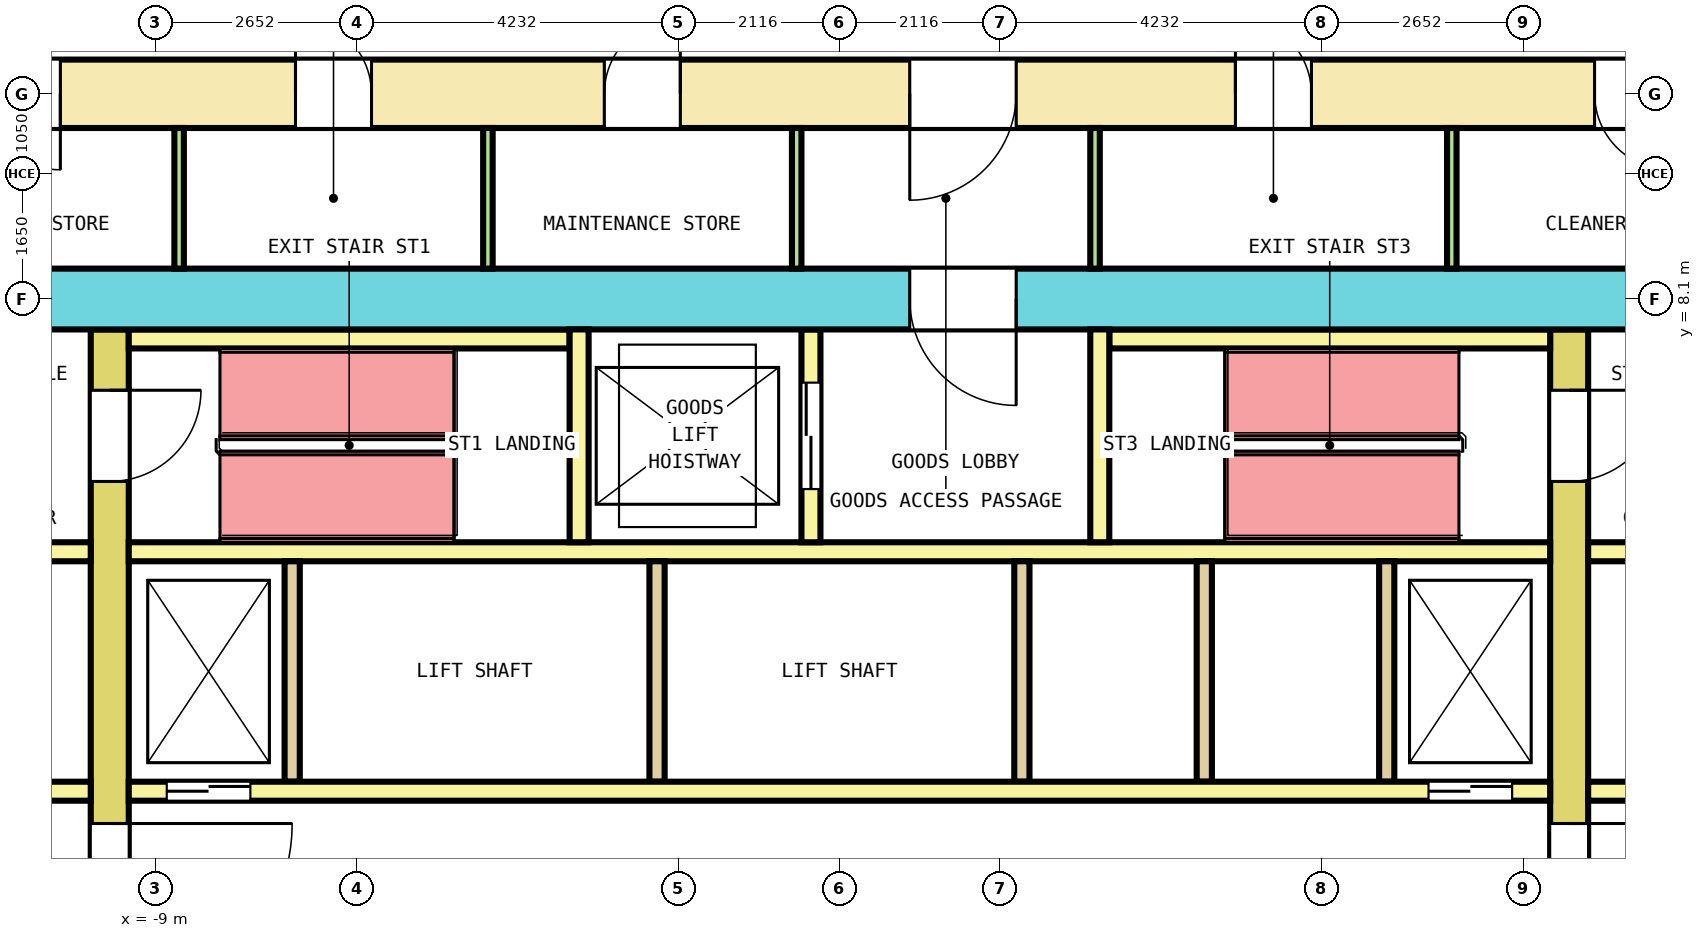
"""IFC4 building model, lengths in metres.
Left out: names, types, materials, properties, quantities, classifications, styles, units other than length and angle.
Written with IfcOpenShell. Run it as: python <this file> out.ifc"""

import sys

from ifc_helpers import new_model, si_unit, direction, frame, frame_2d, origin, place, context, subcontext, project, spatial, rectangle, extrude, element, fill, save


model = new_model("IFC4")
c1 = context("Model", 3, precision=1e-05, world=origin(), true_north=direction((0.0, 1.0)))
c2 = subcontext(c1, "Body", "Model", "MODEL_VIEW")
j1 = project(units=[si_unit("LENGTHUNIT", "METRE"), si_unit("PLANEANGLEUNIT", "RADIAN")], contexts=[c1])
p1 = place(None, origin())
s1 = spatial("IfcSite", under=j1, at=p1, CompositionType="ELEMENT")
p2 = place(p1, origin())
s2 = spatial("IfcBuilding", under=s1, at=p2, CompositionType="ELEMENT")
p3 = place(p2, frame((0.0, 0.0, 36.6)))
s3 = spatial("IfcBuildingStorey", under=s2, at=p3, CompositionType="ELEMENT", Elevation=36.6)
p4 = place(p3, frame((-13.65, 10.8, 0.0), z_axis=(0.0, 0.0, 1.0), x_axis=(1.0, 0.0, 0.0)))
e1 = element("IfcWall", 1, at=p4, inside=s3, PredefinedType="SHEAR", context=c2, shape_type="SweptSolid", body=[
    extrude(rectangle(XDim=27.3, YDim=0.9, at=frame_2d((13.65, 0.0))), origin(), (0.0, 0.0, 1.0), 4.1),
])
p5 = place(p4, frame((2.4, 0.0, 0.0)))
e2 = element("IfcOpeningElement", 2, at=p5, cuts=e1, PredefinedType="OPENING", context=c2, shape_type="SweptSolid", body=[
    extrude(rectangle(XDim=1.0, YDim=2.1, at=frame_2d((0.5, 1.05))), frame((0.0, 0.46, 0.0), z_axis=(0.0, -1.0, 0.0), x_axis=(1.0, 0.0, 0.0)), (0.0, 0.0, 1.0), 0.92),
])
p6 = place(p4, frame((6.494, 0.0, 0.0)))
e3 = element("IfcOpeningElement", 3, at=p6, cuts=e1, PredefinedType="OPENING", context=c2, shape_type="SweptSolid", body=[
    extrude(rectangle(XDim=1.0, YDim=2.1, at=frame_2d((0.5, 1.05))), frame((0.0, 0.46, 0.0), z_axis=(0.0, -1.0, 0.0), x_axis=(1.0, 0.0, 0.0)), (0.0, 0.0, 1.0), 0.92),
])
p7 = place(p4, frame((10.556, 0.0, 0.0)))
e4 = element("IfcOpeningElement", 4, at=p7, cuts=e1, PredefinedType="OPENING", context=c2, shape_type="SweptSolid", body=[
    extrude(rectangle(XDim=1.0, YDim=2.1, at=frame_2d((0.5, 1.05))), frame((0.0, 0.46, 0.0), z_axis=(0.0, -1.0, 0.0), x_axis=(1.0, 0.0, 0.0)), (0.0, 0.0, 1.0), 0.92),
])
p8 = place(p4, frame((18.859, 0.0, 0.0)))
e5 = element("IfcOpeningElement", 5, at=p8, cuts=e1, PredefinedType="OPENING", context=c2, shape_type="SweptSolid", body=[
    extrude(rectangle(XDim=1.0, YDim=2.1, at=frame_2d((0.5, 1.05))), frame((0.0, 0.46, 0.0), z_axis=(0.0, -1.0, 0.0), x_axis=(1.0, 0.0, 0.0)), (0.0, 0.0, 1.0), 0.92),
])
p9 = place(p4, frame((23.584, 0.0, 0.0)))
e6 = element("IfcOpeningElement", 6, at=p9, cuts=e1, PredefinedType="OPENING", context=c2, shape_type="SweptSolid", body=[
    extrude(rectangle(XDim=1.0, YDim=2.1, at=frame_2d((0.5, 1.05))), frame((0.0, 0.46, 0.0), z_axis=(0.0, -1.0, 0.0), x_axis=(1.0, 0.0, 0.0)), (0.0, 0.0, 1.0), 0.92),
])
p10 = place(p4, frame((14.575, 0.0, 0.0)))
e7 = element("IfcOpeningElement", 7, at=p10, cuts=e1, PredefinedType="OPENING", context=c2, shape_type="SweptSolid", body=[
    extrude(rectangle(XDim=1.4, YDim=2.1, at=frame_2d((0.7, 1.05))), frame((0.0, 0.46, 0.0), z_axis=(0.0, -1.0, 0.0), x_axis=(1.0, 0.0, 0.0)), (0.0, 0.0, 1.0), 0.92),
])
p11 = place(p3, frame((-12.75, 8.1, 0.0), z_axis=(0.0, 0.0, 1.0), x_axis=(1.0, 0.0, 0.0)))
e8 = element("IfcWall", 8, at=p11, inside=s3, PredefinedType="SHEAR", context=c2, shape_type="SweptSolid", body=[
    extrude(rectangle(XDim=25.5, YDim=0.8, at=frame_2d((12.75, 0.0))), origin(), (0.0, 0.0, 1.0), 4.1),
])
p12 = place(p11, frame((13.675, 0.0, 0.0)))
e9 = element("IfcOpeningElement", 9, at=p12, cuts=e8, PredefinedType="OPENING", context=c2, shape_type="SweptSolid", body=[
    extrude(rectangle(XDim=1.4, YDim=2.1, at=frame_2d((0.7, 1.05))), frame((0.0, 0.41, 0.0), z_axis=(0.0, -1.0, 0.0), x_axis=(1.0, 0.0, 0.0)), (0.0, 0.0, 1.0), 0.82),
])
p13 = place(p3, frame((-9.6, -7.7, 0.0), z_axis=(0.0, 0.0, 1.0), x_axis=(0.0, 1.0, 0.0)))
e10 = element("IfcWall", 10, at=p13, inside=s3, PredefinedType="SHEAR", context=c2, shape_type="SweptSolid", body=[
    extrude(rectangle(XDim=15.4, YDim=0.5, at=frame_2d((7.7, 0.0))), origin(), (0.0, 0.0, 1.0), 4.1),
])
p14 = place(p13, frame((6.5, 0.0, 0.0)))
e11 = element("IfcOpeningElement", 11, at=p14, cuts=e10, PredefinedType="OPENING", context=c2, shape_type="SweptSolid", body=[
    extrude(rectangle(XDim=2.4, YDim=2.1, at=frame_2d((1.2, 1.05))), frame((0.0, 0.26, 0.0), z_axis=(0.0, -1.0, 0.0), x_axis=(1.0, 0.0, 0.0)), (0.0, 0.0, 1.0), 0.52),
])
p15 = place(p13, frame((13.4, 0.0, 0.0)))
e12 = element("IfcOpeningElement", 12, at=p15, cuts=e10, PredefinedType="OPENING", context=c2, shape_type="SweptSolid", body=[
    extrude(rectangle(XDim=1.2, YDim=2.1, at=frame_2d((0.6, 1.05))), frame((0.0, 0.26, 0.0), z_axis=(0.0, -1.0, 0.0), x_axis=(1.0, 0.0, 0.0)), (0.0, 0.0, 1.0), 0.52),
])
p16 = place(p13, frame((0.8, 0.0, 0.0)))
e13 = element("IfcOpeningElement", 13, at=p16, cuts=e10, PredefinedType="OPENING", context=c2, shape_type="SweptSolid", body=[
    extrude(rectangle(XDim=1.2, YDim=2.1, at=frame_2d((0.6, 1.05))), frame((0.0, 0.26, 0.0), z_axis=(0.0, -1.0, 0.0), x_axis=(1.0, 0.0, 0.0)), (0.0, 0.0, 1.0), 0.52),
])
p17 = place(p3, frame((9.6, -7.7, 0.0), z_axis=(0.0, 0.0, 1.0), x_axis=(0.0, 1.0, 0.0)))
e14 = element("IfcWall", 14, at=p17, inside=s3, PredefinedType="SHEAR", context=c2, shape_type="SweptSolid", body=[
    extrude(rectangle(XDim=15.4, YDim=0.5, at=frame_2d((7.7, 0.0))), origin(), (0.0, 0.0, 1.0), 4.1),
])
p18 = place(p17, frame((6.5, 0.0, 0.0)))
e15 = element("IfcOpeningElement", 15, at=p18, cuts=e14, PredefinedType="OPENING", context=c2, shape_type="SweptSolid", body=[
    extrude(rectangle(XDim=2.4, YDim=2.1, at=frame_2d((1.2, 1.05))), frame((0.0, 0.26, 0.0), z_axis=(0.0, -1.0, 0.0), x_axis=(1.0, 0.0, 0.0)), (0.0, 0.0, 1.0), 0.52),
])
p19 = place(p17, frame((13.4, 0.0, 0.0)))
e16 = element("IfcOpeningElement", 16, at=p19, cuts=e14, PredefinedType="OPENING", context=c2, shape_type="SweptSolid", body=[
    extrude(rectangle(XDim=1.2, YDim=2.1, at=frame_2d((0.6, 1.05))), frame((0.0, 0.26, 0.0), z_axis=(0.0, -1.0, 0.0), x_axis=(1.0, 0.0, 0.0)), (0.0, 0.0, 1.0), 0.52),
])
p20 = place(p17, frame((0.9, 0.0, 0.0)))
e17 = element("IfcOpeningElement", 17, at=p20, cuts=e14, PredefinedType="OPENING", context=c2, shape_type="SweptSolid", body=[
    extrude(rectangle(XDim=1.0, YDim=2.1, at=frame_2d((0.5, 1.05))), frame((0.0, 0.26, 0.0), z_axis=(0.0, -1.0, 0.0), x_axis=(1.0, 0.0, 0.0)), (0.0, 0.0, 1.0), 0.52),
])
p21 = place(p3, frame((-12.75, 1.625, 0.0), z_axis=(0.0, 0.0, 1.0), x_axis=(1.0, 0.0, 0.0)))
e18 = element("IfcWall", 18, at=p21, inside=s3, PredefinedType="SOLIDWALL", context=c2, shape_type="SweptSolid", body=[
    extrude(rectangle(XDim=2.9, YDim=0.25, at=frame_2d((1.45, 0.0))), origin(), (0.0, 0.0, 1.0), 4.1),
])
p22 = place(p21, frame((0.9, 0.0, 0.0)))
e19 = element("IfcOpeningElement", 19, at=p22, cuts=e18, PredefinedType="OPENING", context=c2, shape_type="SweptSolid", body=[
    extrude(rectangle(XDim=1.1, YDim=2.1, at=frame_2d((0.55, 1.05))), frame((0.0, 0.135, 0.0), z_axis=(0.0, -1.0, 0.0), x_axis=(1.0, 0.0, 0.0)), (0.0, 0.0, 1.0), 0.27),
])
p23 = place(p3, frame((-9.35, 1.625, 0.0), z_axis=(0.0, 0.0, 1.0), x_axis=(1.0, 0.0, 0.0)))
e20 = element("IfcWall", 20, at=p23, inside=s3, PredefinedType="SOLIDWALL", context=c2, shape_type="SweptSolid", body=[
    extrude(rectangle(XDim=18.7, YDim=0.25, at=frame_2d((9.35, 0.0))), origin(), (0.0, 0.0, 1.0), 4.1),
])
p24 = place(p23, frame((0.5, 0.0, 0.0)))
e21 = element("IfcOpeningElement", 21, at=p24, cuts=e20, PredefinedType="OPENING", context=c2, shape_type="SweptSolid", body=[
    extrude(rectangle(XDim=1.1, YDim=2.1, at=frame_2d((0.55, 1.05))), frame((0.0, 0.135, 0.0), z_axis=(0.0, -1.0, 0.0), x_axis=(1.0, 0.0, 0.0)), (0.0, 0.0, 1.0), 0.27),
])
p25 = place(p23, frame((17.1, 0.0, 0.0)))
e22 = element("IfcOpeningElement", 22, at=p25, cuts=e20, PredefinedType="OPENING", context=c2, shape_type="SweptSolid", body=[
    extrude(rectangle(XDim=1.1, YDim=2.1, at=frame_2d((0.55, 1.05))), frame((0.0, 0.135, 0.0), z_axis=(0.0, -1.0, 0.0), x_axis=(1.0, 0.0, 0.0)), (0.0, 0.0, 1.0), 0.27),
])
p26 = place(p3, frame((9.85, 1.625, 0.0), z_axis=(0.0, 0.0, 1.0), x_axis=(1.0, 0.0, 0.0)))
e23 = element("IfcWall", 23, at=p26, inside=s3, PredefinedType="SOLIDWALL", context=c2, shape_type="SweptSolid", body=[
    extrude(rectangle(XDim=2.9, YDim=0.25, at=frame_2d((1.45, 0.0))), origin(), (0.0, 0.0, 1.0), 4.1),
])
p27 = place(p26, frame((0.9, 0.0, 0.0)))
e24 = element("IfcOpeningElement", 24, at=p27, cuts=e23, PredefinedType="OPENING", context=c2, shape_type="SweptSolid", body=[
    extrude(rectangle(XDim=1.1, YDim=2.1, at=frame_2d((0.55, 1.05))), frame((0.0, 0.135, 0.0), z_axis=(0.0, -1.0, 0.0), x_axis=(1.0, 0.0, 0.0)), (0.0, 0.0, 1.0), 0.27),
])
p28 = place(p3, frame((-12.75, 4.775, 0.0), z_axis=(0.0, 0.0, 1.0), x_axis=(1.0, 0.0, 0.0)))
e25 = element("IfcWall", 25, at=p28, inside=s3, PredefinedType="SOLIDWALL", context=c2, shape_type="SweptSolid", body=[
    extrude(rectangle(XDim=2.9, YDim=0.25, at=frame_2d((1.45, 0.0))), origin(), (0.0, 0.0, 1.0), 4.1),
])
p29 = place(p3, frame((-9.35, 4.775, 0.0), z_axis=(0.0, 0.0, 1.0), x_axis=(1.0, 0.0, 0.0)))
e26 = element("IfcWall", 26, at=p29, inside=s3, PredefinedType="SOLIDWALL", context=c2, shape_type="SweptSolid", body=[
    extrude(rectangle(XDim=18.7, YDim=0.25, at=frame_2d((9.35, 0.0))), origin(), (0.0, 0.0, 1.0), 4.1),
])
p30 = place(p3, frame((9.85, 4.775, 0.0), z_axis=(0.0, 0.0, 1.0), x_axis=(1.0, 0.0, 0.0)))
e27 = element("IfcWall", 27, at=p30, inside=s3, PredefinedType="SOLIDWALL", context=c2, shape_type="SweptSolid", body=[
    extrude(rectangle(XDim=2.9, YDim=0.25, at=frame_2d((1.45, 0.0))), origin(), (0.0, 0.0, 1.0), 4.1),
])
for number, where, z_axis, x_axis in (
    (28, (-7.2, 1.75, 0.0), (0.0, 0.0, 1.0), (0.0, 1.0, 0.0)),
    (29, (-2.4, 1.75, 0.0), (0.0, 0.0, 1.0), (0.0, 1.0, 0.0)),
    (30, (2.4, 1.75, 0.0), (0.0, 0.0, 1.0), (0.0, 1.0, 0.0)),
    (31, (4.8, 1.75, 0.0), (0.0, 0.0, 1.0), (0.0, 1.0, 0.0)),
    (32, (7.2, 1.75, 0.0), (0.0, 0.0, 1.0), (0.0, 1.0, 0.0)),
):
    element("IfcWall", number, at=place(p3, frame(where, z_axis=z_axis, x_axis=x_axis)), inside=s3, PredefinedType="SOLIDWALL", context=c2, shape_type="SweptSolid", body=[
        extrude(rectangle(XDim=2.9, YDim=0.2, at=frame_2d((1.45, 0.0))), origin(), (0.0, 0.0, 1.0), 4.1),
    ])
for number, where, z_axis, x_axis in (
    (33, (-9.35, 7.575, 0.0), (0.0, 0.0, 1.0), (1.0, 0.0, 0.0)),
    (34, (3.55, 7.575, 0.0), (0.0, 0.0, 1.0), (1.0, 0.0, 0.0)),
):
    element("IfcWall", number, at=place(p3, frame(where, z_axis=z_axis, x_axis=x_axis)), inside=s3, PredefinedType="SOLIDWALL", context=c2, shape_type="SweptSolid", body=[
        extrude(rectangle(XDim=5.8, YDim=0.25, at=frame_2d((2.9, 0.0))), origin(), (0.0, 0.0, 1.0), 4.1),
    ])
p31 = place(p3, frame((-3.425, 4.9, 0.0), z_axis=(0.0, 0.0, 1.0), x_axis=(0.0, 1.0, 0.0)))
e35 = element("IfcWall", 35, at=p31, inside=s3, PredefinedType="SOLIDWALL", context=c2, shape_type="SweptSolid", body=[
    extrude(rectangle(XDim=2.8, YDim=0.25, at=frame_2d((1.4, 0.0))), origin(), (0.0, 0.0, 1.0), 4.1),
])
p32 = place(p3, frame((-0.375, 4.9, 0.0), z_axis=(0.0, 0.0, 1.0), x_axis=(0.0, 1.0, 0.0)))
e36 = element("IfcWall", 36, at=p32, inside=s3, PredefinedType="SOLIDWALL", context=c2, shape_type="SweptSolid", body=[
    extrude(rectangle(XDim=2.8, YDim=0.25, at=frame_2d((1.4, 0.0))), origin(), (0.0, 0.0, 1.0), 4.1),
])
p33 = place(p32, frame((0.7, 0.0, 0.0)))
e37 = element("IfcOpeningElement", 37, at=p33, cuts=e36, PredefinedType="OPENING", context=c2, shape_type="SweptSolid", body=[
    extrude(rectangle(XDim=1.4, YDim=2.1, at=frame_2d((0.7, 1.05))), frame((0.0, 0.135, 0.0), z_axis=(0.0, -1.0, 0.0), x_axis=(1.0, 0.0, 0.0)), (0.0, 0.0, 1.0), 0.27),
])
p34 = place(p3, frame((3.425, 4.9, 0.0), z_axis=(0.0, 0.0, 1.0), x_axis=(0.0, 1.0, 0.0)))
e38 = element("IfcWall", 38, at=p34, inside=s3, PredefinedType="SOLIDWALL", context=c2, shape_type="SweptSolid", body=[
    extrude(rectangle(XDim=2.8, YDim=0.25, at=frame_2d((1.4, 0.0))), origin(), (0.0, 0.0, 1.0), 4.1),
])
for number, where, z_axis, x_axis in (
    (39, (-8.688, 8.5, 0.0), (0.0, 0.0, 1.0), (0.0, 1.0, 0.0)),
    (40, (-4.625, 8.5, 0.0), (0.0, 0.0, 1.0), (0.0, 1.0, 0.0)),
    (41, (-0.562, 8.5, 0.0), (0.0, 0.0, 1.0), (0.0, 1.0, 0.0)),
    (42, (3.363, 8.5, 0.0), (0.0, 0.0, 1.0), (0.0, 1.0, 0.0)),
    (43, (8.056, 8.5, 0.0), (0.0, 0.0, 1.0), (0.0, 1.0, 0.0)),
):
    element("IfcWall", number, at=place(p3, frame(where, z_axis=z_axis, x_axis=x_axis)), inside=s3, PredefinedType="PARTITIONING", context=c2, shape_type="SweptSolid", body=[
        extrude(rectangle(XDim=1.85, YDim=0.125, at=frame_2d((0.925, 0.0))), origin(), (0.0, 0.0, 1.0), 4.1),
    ])
p35 = place(p24, origin())
e44 = element("IfcDoor", 44, at=p35, inside=s3, OperationType="DOUBLE_DOOR_SLIDING", PredefinedType="DOOR", context=c2, shape_type="SweptSolid", body=[
    extrude(rectangle(XDim=1.1, YDim=2.1, at=frame_2d((0.55, 1.05))), frame((0.0, 0.075, 0.0), z_axis=(0.0, -1.0, 0.0), x_axis=(1.0, 0.0, 0.0)), (0.0, 0.0, 1.0), 0.15),
])
fill(e21, e44)
p36 = place(p25, origin())
e45 = element("IfcDoor", 45, at=p36, inside=s3, OperationType="DOUBLE_DOOR_SLIDING", PredefinedType="DOOR", context=c2, shape_type="SweptSolid", body=[
    extrude(rectangle(XDim=1.1, YDim=2.1, at=frame_2d((0.55, 1.05))), frame((0.0, 0.075, 0.0), z_axis=(0.0, -1.0, 0.0), x_axis=(1.0, 0.0, 0.0)), (0.0, 0.0, 1.0), 0.15),
])
fill(e22, e45)
p37 = place(p33, origin())
e46 = element("IfcDoor", 46, at=p37, inside=s3, OperationType="DOUBLE_DOOR_SLIDING", PredefinedType="DOOR", context=c2, shape_type="SweptSolid", body=[
    extrude(rectangle(XDim=1.4, YDim=2.1, at=frame_2d((0.7, 1.05))), frame((0.0, 0.075, 0.0), z_axis=(0.0, -1.0, 0.0), x_axis=(1.0, 0.0, 0.0)), (0.0, 0.0, 1.0), 0.15),
])
fill(e37, e46)
p38 = place(p14, origin())
e47 = element("IfcDoor", 47, at=p38, inside=s3, OperationType="DOUBLE_DOOR_SINGLE_SWING", PredefinedType="DOOR", context=c2, shape_type="SweptSolid", body=[
    extrude(rectangle(XDim=2.4, YDim=2.1, at=frame_2d((1.2, 1.05))), frame((0.0, 0.2, 0.0), z_axis=(0.0, -1.0, 0.0), x_axis=(1.0, 0.0, 0.0)), (0.0, 0.0, 1.0), 0.4),
])
fill(e11, e47)
p39 = place(p18, origin())
e48 = element("IfcDoor", 48, at=p39, inside=s3, OperationType="DOUBLE_DOOR_SINGLE_SWING", PredefinedType="DOOR", context=c2, shape_type="SweptSolid", body=[
    extrude(rectangle(XDim=2.4, YDim=2.1, at=frame_2d((1.2, 1.05))), frame((0.0, 0.2, 0.0), z_axis=(0.0, -1.0, 0.0), x_axis=(1.0, 0.0, 0.0)), (0.0, 0.0, 1.0), 0.4),
])
fill(e15, e48)
p40 = place(p15, origin())
e49 = element("IfcDoor", 49, at=p40, inside=s3, OperationType="SINGLE_SWING_RIGHT", PredefinedType="DOOR", context=c2, shape_type="SweptSolid", body=[
    extrude(rectangle(XDim=1.2, YDim=2.1, at=frame_2d((0.6, 1.05))), frame((0.0, 0.2, 0.0), z_axis=(0.0, -1.0, 0.0), x_axis=(1.0, 0.0, 0.0)), (0.0, 0.0, 1.0), 0.4),
])
fill(e12, e49)
p41 = place(p19, origin())
e50 = element("IfcDoor", 50, at=p41, inside=s3, OperationType="SINGLE_SWING_RIGHT", PredefinedType="DOOR", context=c2, shape_type="SweptSolid", body=[
    extrude(rectangle(XDim=1.2, YDim=2.1, at=frame_2d((0.6, 1.05))), frame((0.0, 0.2, 0.0), z_axis=(0.0, -1.0, 0.0), x_axis=(1.0, 0.0, 0.0)), (0.0, 0.0, 1.0), 0.4),
])
fill(e16, e50)
p42 = place(p12, origin())
e51 = element("IfcDoor", 51, at=p42, inside=s3, OperationType="DOUBLE_DOOR_SINGLE_SWING", PredefinedType="DOOR", context=c2, shape_type="SweptSolid", body=[
    extrude(rectangle(XDim=1.4, YDim=2.1, at=frame_2d((0.7, 1.05))), frame((0.0, 0.3, 0.0), z_axis=(0.0, -1.0, 0.0), x_axis=(1.0, 0.0, 0.0)), (0.0, 0.0, 1.0), 0.6),
])
fill(e9, e51)
p43 = place(p5, origin())
e52 = element("IfcDoor", 52, at=p43, inside=s3, OperationType="SINGLE_SWING_LEFT", PredefinedType="DOOR", context=c2, shape_type="SweptSolid", body=[
    extrude(rectangle(XDim=1.0, YDim=2.1, at=frame_2d((0.5, 1.05))), frame((0.0, 0.3, 0.0), z_axis=(0.0, -1.0, 0.0), x_axis=(1.0, 0.0, 0.0)), (0.0, 0.0, 1.0), 0.6),
])
fill(e2, e52)
p44 = place(p6, origin())
e53 = element("IfcDoor", 53, at=p44, inside=s3, OperationType="SINGLE_SWING_RIGHT", PredefinedType="DOOR", context=c2, shape_type="SweptSolid", body=[
    extrude(rectangle(XDim=1.0, YDim=2.1, at=frame_2d((0.5, 1.05))), frame((0.0, 0.3, 0.0), z_axis=(0.0, -1.0, 0.0), x_axis=(1.0, 0.0, 0.0)), (0.0, 0.0, 1.0), 0.6),
])
fill(e3, e53)
p45 = place(p7, origin())
e54 = element("IfcDoor", 54, at=p45, inside=s3, OperationType="SINGLE_SWING_LEFT", PredefinedType="DOOR", context=c2, shape_type="SweptSolid", body=[
    extrude(rectangle(XDim=1.0, YDim=2.1, at=frame_2d((0.5, 1.05))), frame((0.0, 0.3, 0.0), z_axis=(0.0, -1.0, 0.0), x_axis=(1.0, 0.0, 0.0)), (0.0, 0.0, 1.0), 0.6),
])
fill(e4, e54)
p46 = place(p8, origin())
e55 = element("IfcDoor", 55, at=p46, inside=s3, OperationType="SINGLE_SWING_RIGHT", PredefinedType="DOOR", context=c2, shape_type="SweptSolid", body=[
    extrude(rectangle(XDim=1.0, YDim=2.1, at=frame_2d((0.5, 1.05))), frame((0.0, 0.3, 0.0), z_axis=(0.0, -1.0, 0.0), x_axis=(1.0, 0.0, 0.0)), (0.0, 0.0, 1.0), 0.6),
])
fill(e5, e55)
p47 = place(p9, origin())
e56 = element("IfcDoor", 56, at=p47, inside=s3, OperationType="SINGLE_SWING_LEFT", PredefinedType="DOOR", context=c2, shape_type="SweptSolid", body=[
    extrude(rectangle(XDim=1.0, YDim=2.1, at=frame_2d((0.5, 1.05))), frame((0.0, 0.3, 0.0), z_axis=(0.0, -1.0, 0.0), x_axis=(1.0, 0.0, 0.0)), (0.0, 0.0, 1.0), 0.6),
])
fill(e6, e56)
p48 = place(p10, origin())
e57 = element("IfcDoor", 57, at=p48, inside=s3, OperationType="DOUBLE_DOOR_SINGLE_SWING", PredefinedType="DOOR", context=c2, shape_type="SweptSolid", body=[
    extrude(rectangle(XDim=1.4, YDim=2.1, at=frame_2d((0.7, 1.05))), frame((0.0, 0.3, 0.0), z_axis=(0.0, -1.0, 0.0), x_axis=(1.0, 0.0, 0.0)), (0.0, 0.0, 1.0), 0.6),
])
fill(e7, e57)
save(model, sys.argv[1])
